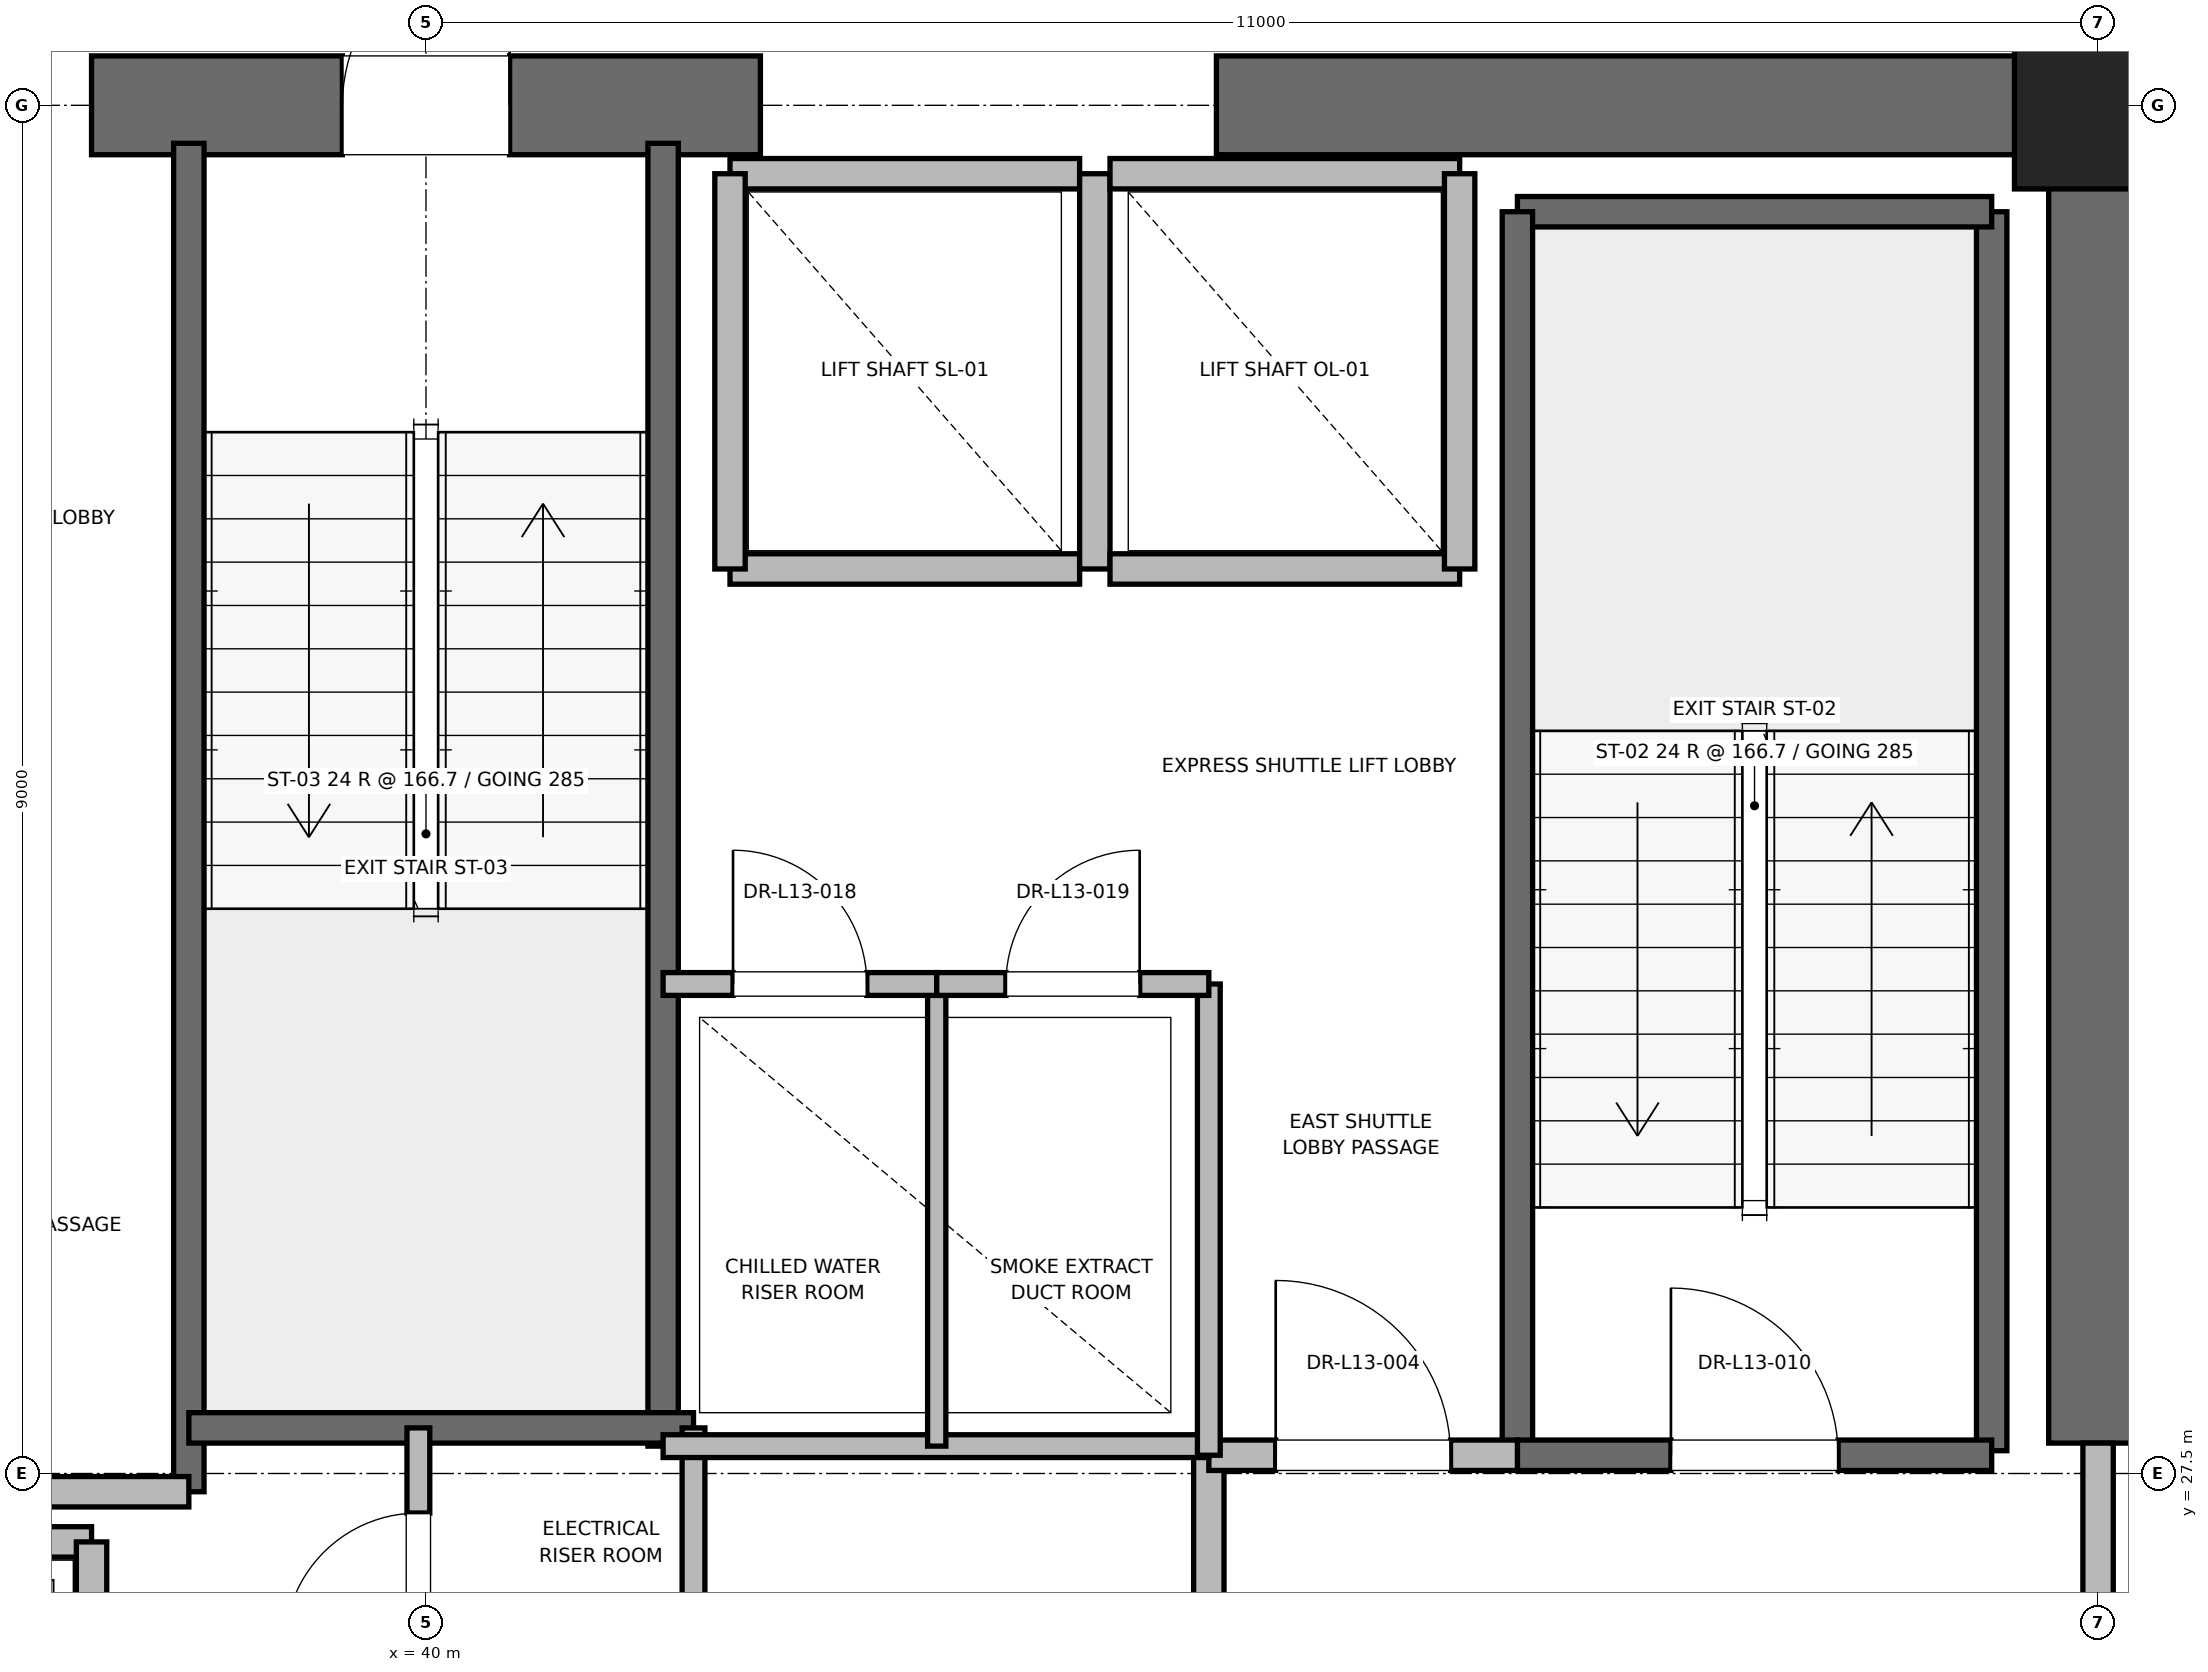
"""IFC4 building model, lengths in metres.
Left out: names, types, materials, properties, quantities, classifications, styles, units other than length and angle.
Written with IfcOpenShell. Run it as: python <this file> out.ifc"""

import sys

from ifc_helpers import new_model, si_unit, direction, frame, frame_2d, origin, origin_2d, place, context, subcontext, project, spatial, rectangle, extrude, element, fill, save


model = new_model("IFC4")
c1 = context("Model", 3, precision=1e-05, world=origin(), true_north=direction((0.0, 1.0)))
c2 = subcontext(c1, "Body", "Model", "MODEL_VIEW")
j1 = project(units=[si_unit("LENGTHUNIT", "METRE"), si_unit("PLANEANGLEUNIT", "RADIAN")], contexts=[c1])
p1 = place(None, origin())
s1 = spatial("IfcSite", under=j1, at=p1, CompositionType="ELEMENT")
p2 = place(p1, origin())
s2 = spatial("IfcBuilding", under=s1, at=p2, CompositionType="ELEMENT")
p3 = place(p2, frame((0.0, 0.0, 59.6)))
s3 = spatial("IfcBuildingStorey", under=s2, at=p3, CompositionType="ELEMENT", Elevation=59.6)
p4 = place(p3, frame((51.0, 36.5, 0.0), z_axis=(0.0, 0.0, 1.0), x_axis=(1.0, 0.0, 0.0)))
e1 = element("IfcColumn", 1, at=p4, inside=s3, PredefinedType="PILASTER", context=c2, shape_type="SweptSolid", body=[
    extrude(rectangle(XDim=1.1, YDim=1.1, at=origin_2d()), origin(), (0.0, 0.0, 1.0), 4.0),
])
p5 = place(p3, frame((37.8, 36.5, 0.0), z_axis=(0.0, 0.0, 1.0), x_axis=(1.0, 0.0, 0.0)))
e2 = element("IfcWall", 2, at=p5, inside=s3, PredefinedType="SHEAR", context=c2, shape_type="SweptSolid", body=[
    extrude(rectangle(XDim=4.4, YDim=0.65, at=frame_2d((2.2, 0.0))), origin(), (0.0, 0.0, 1.0), 3.76),
])
p6 = place(p5, frame((1.65, 0.0, 0.0)))
e3 = element("IfcOpeningElement", 3, at=p6, cuts=e2, PredefinedType="OPENING", context=c2, shape_type="SweptSolid", body=[
    extrude(rectangle(XDim=1.1, YDim=2.15, at=frame_2d((0.55, 1.075))), frame((0.0, 0.325, 0.0), z_axis=(0.0, -1.0, 0.0), x_axis=(1.0, 0.0, 0.0)), (0.0, 0.0, 1.0), 0.65),
])
p7 = place(p3, frame((45.2, 36.5, 0.0), z_axis=(0.0, 0.0, 1.0), x_axis=(1.0, 0.0, 0.0)))
e4 = element("IfcWall", 4, at=p7, inside=s3, PredefinedType="SHEAR", context=c2, shape_type="SweptSolid", body=[
    extrude(rectangle(XDim=5.8, YDim=0.65, at=frame_2d((2.9, 0.0))), origin(), (0.0, 0.0, 1.0), 3.76),
])
p8 = place(p3, frame((51.0, 27.7, 0.0), z_axis=(0.0, 0.0, 1.0), x_axis=(0.0, 1.0, 0.0)))
e5 = element("IfcWall", 5, at=p8, inside=s3, PredefinedType="SHEAR", context=c2, shape_type="SweptSolid", body=[
    extrude(rectangle(XDim=8.8, YDim=0.65, at=frame_2d((4.4, 0.0))), origin(), (0.0, 0.0, 1.0), 3.76),
])
p9 = place(p3, frame((50.3, 27.65, 0.0), z_axis=(0.0, 0.0, 1.0), x_axis=(0.0, 1.0, 0.0)))
e6 = element("IfcWall", 6, at=p9, inside=s3, PredefinedType="SOLIDWALL", context=c2, shape_type="SweptSolid", body=[
    extrude(rectangle(XDim=8.15, YDim=0.2, at=frame_2d((4.075, 0.0))), origin(), (0.0, 0.0, 1.0), 3.76),
])
p10 = place(p3, frame((47.18, 35.8, 0.0), z_axis=(0.0, 0.0, 1.0), x_axis=(1.0, 0.0, 0.0)))
e7 = element("IfcWall", 7, at=p10, inside=s3, PredefinedType="SOLIDWALL", context=c2, shape_type="SweptSolid", body=[
    extrude(rectangle(XDim=3.12, YDim=0.2, at=frame_2d((1.56, 0.0))), origin(), (0.0, 0.0, 1.0), 3.76),
])
p11 = place(p3, frame((47.18, 27.62, 0.0), z_axis=(0.0, 0.0, 1.0), x_axis=(0.0, 1.0, 0.0)))
e8 = element("IfcWall", 8, at=p11, inside=s3, PredefinedType="SOLIDWALL", context=c2, shape_type="SweptSolid", body=[
    extrude(rectangle(XDim=8.18, YDim=0.2, at=frame_2d((4.09, 0.0))), origin(), (0.0, 0.0, 1.0), 3.76),
])
p12 = place(p3, frame((47.18, 27.62, 0.0), z_axis=(0.0, 0.0, 1.0), x_axis=(1.0, 0.0, 0.0)))
e9 = element("IfcWall", 9, at=p12, inside=s3, PredefinedType="SOLIDWALL", context=c2, shape_type="SweptSolid", body=[
    extrude(rectangle(XDim=3.12, YDim=0.2, at=frame_2d((1.56, 0.0))), origin(), (0.0, 0.0, 1.0), 3.76),
])
p13 = place(p12, frame((1.01, 0.0, 0.0)))
e10 = element("IfcOpeningElement", 10, at=p13, cuts=e9, PredefinedType="OPENING", context=c2, shape_type="SweptSolid", body=[
    extrude(rectangle(XDim=1.1, YDim=2.15, at=frame_2d((0.55, 1.075))), frame((0.0, 0.1, 0.0), z_axis=(0.0, -1.0, 0.0), x_axis=(1.0, 0.0, 0.0)), (0.0, 0.0, 1.0), 0.2),
])
p14 = place(p3, frame((38.44, 27.38, 0.0), z_axis=(0.0, 0.0, 1.0), x_axis=(0.0, 1.0, 0.0)))
e11 = element("IfcWall", 11, at=p14, inside=s3, PredefinedType="SOLIDWALL", context=c2, shape_type="SweptSolid", body=[
    extrude(rectangle(XDim=8.87, YDim=0.2, at=frame_2d((4.435, 0.0))), origin(), (0.0, 0.0, 1.0), 3.76),
])
p15 = place(p3, frame((41.56, 27.68, 0.0), z_axis=(0.0, 0.0, 1.0), x_axis=(0.0, 1.0, 0.0)))
e12 = element("IfcWall", 12, at=p15, inside=s3, PredefinedType="SOLIDWALL", context=c2, shape_type="SweptSolid", body=[
    extrude(rectangle(XDim=8.57, YDim=0.2, at=frame_2d((4.285, 0.0))), origin(), (0.0, 0.0, 1.0), 3.76),
])
p16 = place(p3, frame((38.44, 27.8, 0.0), z_axis=(0.0, 0.0, 1.0), x_axis=(1.0, 0.0, 0.0)))
e13 = element("IfcWall", 13, at=p16, inside=s3, PredefinedType="SOLIDWALL", context=c2, shape_type="SweptSolid", body=[
    extrude(rectangle(XDim=3.32, YDim=0.2, at=frame_2d((1.66, 0.0))), origin(), (0.0, 0.0, 1.0), 3.76),
])
p17 = place(p3, frame((32.82, 27.38, 0.0), z_axis=(0.0, 0.0, 1.0), x_axis=(1.0, 0.0, 0.0)))
e14 = element("IfcWall", 14, at=p17, inside=s3, PredefinedType="PARTITIONING", context=c2, shape_type="SweptSolid", body=[
    extrude(rectangle(XDim=5.62, YDim=0.2, at=frame_2d((2.81, 0.0))), origin(), (0.0, 0.0, 1.0), 3.76),
])
p18 = place(p3, frame((45.15, 24.25, 0.0), z_axis=(0.0, 0.0, 1.0), x_axis=(0.0, 1.0, 0.0)))
e15 = element("IfcWall", 15, at=p18, inside=s3, PredefinedType="PARTITIONING", context=c2, shape_type="SweptSolid", body=[
    extrude(rectangle(XDim=3.37, YDim=0.2, at=frame_2d((1.685, 0.0))), origin(), (0.0, 0.0, 1.0), 3.76),
])
p19 = place(p3, frame((45.15, 27.62, 0.0), z_axis=(0.0, 0.0, 1.0), x_axis=(1.0, 0.0, 0.0)))
e16 = element("IfcWall", 16, at=p19, inside=s3, PredefinedType="PARTITIONING", context=c2, shape_type="SweptSolid", body=[
    extrude(rectangle(XDim=2.03, YDim=0.2, at=frame_2d((1.015, 0.0))), origin(), (0.0, 0.0, 1.0), 3.76),
])
p20 = place(p19, frame((0.44, 0.0, 0.0)))
e17 = element("IfcOpeningElement", 17, at=p20, cuts=e16, PredefinedType="OPENING", context=c2, shape_type="SweptSolid", body=[
    extrude(rectangle(XDim=1.15, YDim=2.2, at=frame_2d((0.575, 1.1))), frame((0.0, 0.1, 0.0), z_axis=(0.0, -1.0, 0.0), x_axis=(1.0, 0.0, 0.0)), (0.0, 0.0, 1.0), 0.2),
])
p21 = place(p3, frame((51.0, 24.3, 0.0), z_axis=(0.0, 0.0, 1.0), x_axis=(0.0, 1.0, 0.0)))
e18 = element("IfcWall", 18, at=p21, inside=s3, PredefinedType="PARTITIONING", context=c2, shape_type="SweptSolid", body=[
    extrude(rectangle(XDim=3.4, YDim=0.2, at=frame_2d((1.7, 0.0))), origin(), (0.0, 0.0, 1.0), 2.54),
])
p22 = place(p21, frame((1.125, 0.0, 0.0)))
e19 = element("IfcOpeningElement", 19, at=p22, cuts=e18, PredefinedType="OPENING", context=c2, shape_type="SweptSolid", body=[
    extrude(rectangle(XDim=1.15, YDim=2.2, at=frame_2d((0.575, 1.1))), frame((0.0, 0.1, 0.0), z_axis=(0.0, -1.0, 0.0), x_axis=(1.0, 0.0, 0.0)), (0.0, 0.0, 1.0), 0.2),
])
p23 = place(p3, frame((37.8, 27.05, 0.0), z_axis=(0.0, 0.0, 1.0), x_axis=(-1.0, 0.0, 0.0)))
e20 = element("IfcWall", 20, at=p23, inside=s3, PredefinedType="SOLIDWALL", context=c2, shape_type="SweptSolid", body=[
    extrude(rectangle(XDim=2.3, YDim=0.2, at=frame_2d((1.15, 0.0))), origin(), (0.0, 0.0, 1.0), 3.76),
])
p24 = place(p3, frame((37.8, 24.45, 0.0), z_axis=(0.0, 0.0, 1.0), x_axis=(0.0, 1.0, 0.0)))
e21 = element("IfcWall", 21, at=p24, inside=s3, PredefinedType="SOLIDWALL", context=c2, shape_type="SweptSolid", body=[
    extrude(rectangle(XDim=2.6, YDim=0.2, at=frame_2d((1.3, 0.0))), origin(), (0.0, 0.0, 1.0), 3.76),
])
p25 = place(p3, frame((42.0, 33.45, 0.0), z_axis=(0.0, 0.0, 1.0), x_axis=(1.0, 0.0, 0.0)))
e22 = element("IfcWall", 22, at=p25, inside=s3, PredefinedType="SOLIDWALL", context=c2, shape_type="SweptSolid", body=[
    extrude(rectangle(XDim=2.3, YDim=0.2, at=frame_2d((1.15, 0.0))), origin(), (0.0, 0.0, 1.0), 3.76),
])
p26 = place(p3, frame((44.3, 36.05, 0.0), z_axis=(0.0, 0.0, 1.0), x_axis=(-1.0, 0.0, 0.0)))
e23 = element("IfcWall", 23, at=p26, inside=s3, PredefinedType="SOLIDWALL", context=c2, shape_type="SweptSolid", body=[
    extrude(rectangle(XDim=2.3, YDim=0.2, at=frame_2d((1.15, 0.0))), origin(), (0.0, 0.0, 1.0), 2.54),
])
for number, where, z_axis, x_axis in (
    (24, (42.0, 36.05, 0.0), (0.0, 0.0, 1.0), (0.0, -1.0, 0.0)),
    (25, (44.4, 33.45, 0.0), (0.0, 0.0, 1.0), (0.0, 1.0, 0.0)),
):
    element("IfcWall", number, at=place(p3, frame(where, z_axis=z_axis, x_axis=x_axis)), inside=s3, PredefinedType="SOLIDWALL", context=c2, shape_type="SweptSolid", body=[
        extrude(rectangle(XDim=2.6, YDim=0.2, at=frame_2d((1.3, 0.0))), origin(), (0.0, 0.0, 1.0), 2.54),
    ])
p27 = place(p3, frame((44.5, 33.45, 0.0), z_axis=(0.0, 0.0, 1.0), x_axis=(1.0, 0.0, 0.0)))
e26 = element("IfcWall", 26, at=p27, inside=s3, PredefinedType="SOLIDWALL", context=c2, shape_type="SweptSolid", body=[
    extrude(rectangle(XDim=2.3, YDim=0.2, at=frame_2d((1.15, 0.0))), origin(), (0.0, 0.0, 1.0), 3.76),
])
p28 = place(p3, frame((46.8, 36.05, 0.0), z_axis=(0.0, 0.0, 1.0), x_axis=(-1.0, 0.0, 0.0)))
e27 = element("IfcWall", 27, at=p28, inside=s3, PredefinedType="SOLIDWALL", context=c2, shape_type="SweptSolid", body=[
    extrude(rectangle(XDim=2.3, YDim=0.2, at=frame_2d((1.15, 0.0))), origin(), (0.0, 0.0, 1.0), 2.54),
])
p29 = place(p3, frame((46.8, 33.45, 0.0), z_axis=(0.0, 0.0, 1.0), x_axis=(0.0, 1.0, 0.0)))
e28 = element("IfcWall", 28, at=p29, inside=s3, PredefinedType="SOLIDWALL", context=c2, shape_type="SweptSolid", body=[
    extrude(rectangle(XDim=2.6, YDim=0.2, at=frame_2d((1.3, 0.0))), origin(), (0.0, 0.0, 1.0), 3.76),
])
p30 = place(p3, frame((41.76, 23.8, 0.0), z_axis=(0.0, 0.0, 1.0), x_axis=(0.0, 1.0, 0.0)))
e29 = element("IfcWall", 29, at=p30, inside=s3, PredefinedType="PARTITIONING", context=c2, shape_type="SweptSolid", body=[
    extrude(rectangle(XDim=4.0, YDim=0.15, at=frame_2d((2.0, 0.0))), origin(), (0.0, 0.0, 1.0), 2.85),
])
p31 = place(p3, frame((39.95, 25.8, 0.0), z_axis=(0.0, 0.0, 1.0), x_axis=(0.0, 1.0, 0.0)))
e30 = element("IfcWall", 30, at=p31, inside=s3, PredefinedType="PARTITIONING", context=c2, shape_type="SweptSolid", body=[
    extrude(rectangle(XDim=2.0, YDim=0.15, at=frame_2d((1.0, 0.0))), origin(), (0.0, 0.0, 1.0), 2.85),
])
p32 = place(p31, frame((0.56, 0.0, 0.0)))
e31 = element("IfcOpeningElement", 31, at=p32, cuts=e30, PredefinedType="OPENING", context=c2, shape_type="SweptSolid", body=[
    extrude(rectangle(XDim=0.88, YDim=2.1, at=frame_2d((0.44, 1.05))), frame((0.0, 0.075, 0.0), z_axis=(0.0, -1.0, 0.0), x_axis=(1.0, 0.0, 0.0)), (0.0, 0.0, 1.0), 0.15),
])
p33 = place(p3, frame((41.56, 27.68, 0.0), z_axis=(0.0, 0.0, 1.0), x_axis=(1.0, 0.0, 0.0)))
e32 = element("IfcWall", 32, at=p33, inside=s3, PredefinedType="PARTITIONING", context=c2, shape_type="SweptSolid", body=[
    extrude(rectangle(XDim=3.59, YDim=0.15, at=frame_2d((1.795, 0.0))), origin(), (0.0, 0.0, 1.0), 2.85),
])
p34 = place(p3, frame((45.15, 27.62, 0.0), z_axis=(0.0, 0.0, 1.0), x_axis=(0.0, 1.0, 0.0)))
e33 = element("IfcWall", 33, at=p34, inside=s3, PredefinedType="PARTITIONING", context=c2, shape_type="SweptSolid", body=[
    extrude(rectangle(XDim=3.1, YDim=0.15, at=frame_2d((1.55, 0.0))), origin(), (0.0, 0.0, 1.0), 2.85),
])
p35 = place(p3, frame((43.36, 27.68, 0.0), z_axis=(0.0, 0.0, 1.0), x_axis=(0.0, 1.0, 0.0)))
e34 = element("IfcWall", 34, at=p35, inside=s3, PredefinedType="PARTITIONING", context=c2, shape_type="SweptSolid", body=[
    extrude(rectangle(XDim=3.04, YDim=0.12, at=frame_2d((1.52, 0.0))), origin(), (0.0, 0.0, 1.0), 2.85),
])
p36 = place(p3, frame((41.56, 30.72, 0.0), z_axis=(0.0, 0.0, 1.0), x_axis=(1.0, 0.0, 0.0)))
e35 = element("IfcWall", 35, at=p36, inside=s3, PredefinedType="PARTITIONING", context=c2, shape_type="SweptSolid", body=[
    extrude(rectangle(XDim=1.8, YDim=0.15, at=frame_2d((0.9, 0.0))), origin(), (0.0, 0.0, 1.0), 2.85),
])
p37 = place(p36, frame((0.46, 0.0, 0.0)))
e36 = element("IfcOpeningElement", 36, at=p37, cuts=e35, PredefinedType="OPENING", context=c2, shape_type="SweptSolid", body=[
    extrude(rectangle(XDim=0.88, YDim=2.1, at=frame_2d((0.44, 1.05))), frame((0.0, 0.075, 0.0), z_axis=(0.0, -1.0, 0.0), x_axis=(1.0, 0.0, 0.0)), (0.0, 0.0, 1.0), 0.15),
])
p38 = place(p3, frame((43.36, 30.72, 0.0), z_axis=(0.0, 0.0, 1.0), x_axis=(1.0, 0.0, 0.0)))
e37 = element("IfcWall", 37, at=p38, inside=s3, PredefinedType="PARTITIONING", context=c2, shape_type="SweptSolid", body=[
    extrude(rectangle(XDim=1.79, YDim=0.15, at=frame_2d((0.895, 0.0))), origin(), (0.0, 0.0, 1.0), 2.85),
])
p39 = place(p38, frame((0.455, 0.0, 0.0)))
e38 = element("IfcOpeningElement", 38, at=p39, cuts=e37, PredefinedType="OPENING", context=c2, shape_type="SweptSolid", body=[
    extrude(rectangle(XDim=0.88, YDim=2.1, at=frame_2d((0.44, 1.05))), frame((0.0, 0.075, 0.0), z_axis=(0.0, -1.0, 0.0), x_axis=(1.0, 0.0, 0.0)), (0.0, 0.0, 1.0), 0.15),
])
p40 = place(p13, origin())
e39 = element("IfcDoor", 39, at=p40, inside=s3, OperationType="SINGLE_SWING_LEFT", PredefinedType="DOOR", context=c2, shape_type="SweptSolid", body=[
    extrude(rectangle(XDim=1.1, YDim=2.15, at=frame_2d((0.55, 1.075))), frame((0.0, 0.025, 0.0), z_axis=(0.0, -1.0, 0.0), x_axis=(1.0, 0.0, 0.0)), (0.0, 0.0, 1.0), 0.05),
])
fill(e10, e39)
p41 = place(p6, origin())
e40 = element("IfcDoor", 40, at=p41, inside=s3, OperationType="SINGLE_SWING_RIGHT", PredefinedType="DOOR", context=c2, shape_type="SweptSolid", body=[
    extrude(rectangle(XDim=1.1, YDim=2.15, at=frame_2d((0.55, 1.075))), frame((0.0, 0.025, 0.0), z_axis=(0.0, -1.0, 0.0), x_axis=(1.0, 0.0, 0.0)), (0.0, 0.0, 1.0), 0.05),
])
fill(e3, e40)
p42 = place(p20, origin())
e41 = element("IfcDoor", 41, at=p42, inside=s3, OperationType="SINGLE_SWING_LEFT", PredefinedType="DOOR", context=c2, shape_type="SweptSolid", body=[
    extrude(rectangle(XDim=1.15, YDim=2.2, at=frame_2d((0.575, 1.1))), frame((0.0, 0.025, 0.0), z_axis=(0.0, -1.0, 0.0), x_axis=(1.0, 0.0, 0.0)), (0.0, 0.0, 1.0), 0.05),
])
fill(e17, e41)
p43 = place(p32, origin())
e42 = element("IfcDoor", 42, at=p43, inside=s3, OperationType="SINGLE_SWING_LEFT", PredefinedType="DOOR", context=c2, shape_type="SweptSolid", body=[
    extrude(rectangle(XDim=0.88, YDim=2.1, at=frame_2d((0.44, 1.05))), frame((0.0, 0.025, 0.0), z_axis=(0.0, -1.0, 0.0), x_axis=(1.0, 0.0, 0.0)), (0.0, 0.0, 1.0), 0.05),
])
fill(e31, e42)
p44 = place(p37, origin())
e43 = element("IfcDoor", 43, at=p44, inside=s3, OperationType="SINGLE_SWING_LEFT", PredefinedType="DOOR", context=c2, shape_type="SweptSolid", body=[
    extrude(rectangle(XDim=0.88, YDim=2.1, at=frame_2d((0.44, 1.05))), frame((0.0, 0.025, 0.0), z_axis=(0.0, -1.0, 0.0), x_axis=(1.0, 0.0, 0.0)), (0.0, 0.0, 1.0), 0.05),
])
fill(e36, e43)
p45 = place(p39, origin())
e44 = element("IfcDoor", 44, at=p45, inside=s3, OperationType="SINGLE_SWING_RIGHT", PredefinedType="DOOR", context=c2, shape_type="SweptSolid", body=[
    extrude(rectangle(XDim=0.88, YDim=2.1, at=frame_2d((0.44, 1.05))), frame((0.0, 0.025, 0.0), z_axis=(0.0, -1.0, 0.0), x_axis=(1.0, 0.0, 0.0)), (0.0, 0.0, 1.0), 0.05),
])
fill(e38, e44)
save(model, sys.argv[1])
